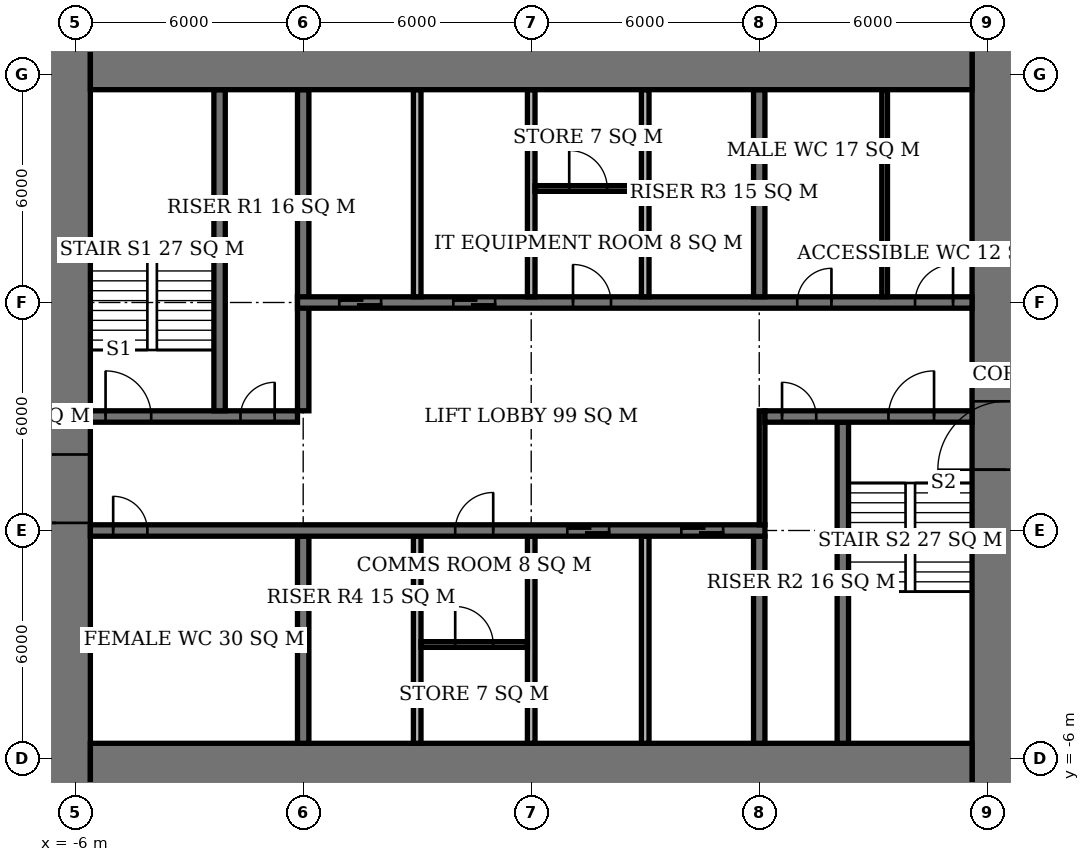
"""IFC4 building model, lengths in metres.
Left out: names, types, materials, properties, quantities, classifications, styles, units other than length and angle.
Written with IfcOpenShell. Run it as: python <this file> out.ifc"""

import sys

from ifc_helpers import new_model, si_unit, direction, frame, frame_2d, origin, place, context, subcontext, project, spatial, rectangle, extrude, element, fill, save


model = new_model("IFC4")
c1 = context("Model", 3, precision=1e-05, world=origin(), true_north=direction((0.0, 1.0)))
c2 = subcontext(c1, "Body", "Model", "MODEL_VIEW")
j1 = project(units=[si_unit("LENGTHUNIT", "METRE"), si_unit("PLANEANGLEUNIT", "RADIAN")], contexts=[c1])
p1 = place(None, origin())
s1 = spatial("IfcSite", under=j1, at=p1, CompositionType="ELEMENT")
p2 = place(p1, origin())
s2 = spatial("IfcBuilding", under=s1, at=p2, CompositionType="ELEMENT")
p3 = place(p2, frame((0.0, 0.0, 224.0)))
s3 = spatial("IfcBuildingStorey", under=s2, at=p3, CompositionType="ELEMENT", Elevation=224.0)
for number, where, z_axis, x_axis in (
    (1, (-5.6, -6.6, 0.0), (0.0, 0.0, 1.0), (1.0, 0.0, 0.0)),
    (2, (-5.6, 12.6, 0.0), (0.0, 0.0, 1.0), (1.0, 0.0, 0.0)),
):
    element("IfcWall", number, at=place(p3, frame(where, z_axis=z_axis, x_axis=x_axis)), inside=s3, PredefinedType="SHEAR", context=c2, shape_type="SweptSolid", body=[
        extrude(rectangle(XDim=23.2, YDim=2.0, at=frame_2d((11.6, 0.0))), origin(), (0.0, 0.0, 1.0), 3.9),
    ])
p4 = place(p3, frame((-6.5, -7.6, 0.0), z_axis=(0.0, 0.0, 1.0), x_axis=(0.0, 1.0, 0.0)))
e3 = element("IfcWall", 3, at=p4, inside=s3, PredefinedType="SHEAR", context=c2, shape_type="SweptSolid", body=[
    extrude(rectangle(XDim=21.2, YDim=1.8, at=frame_2d((10.6, 0.0))), origin(), (0.0, 0.0, 1.0), 3.9),
])
p5 = place(p4, frame((7.8, 0.0, 0.0)))
e4 = element("IfcOpeningElement", 4, at=p5, cuts=e3, PredefinedType="OPENING", context=c2, shape_type="SweptSolid", body=[
    extrude(rectangle(XDim=1.8, YDim=2.4, at=frame_2d((0.9, 1.2))), frame((0.0, 0.91, 0.0), z_axis=(0.0, -1.0, 0.0), x_axis=(1.0, 0.0, 0.0)), (0.0, 0.0, 1.0), 1.82),
])
p6 = place(p3, frame((18.5, -7.6, 0.0), z_axis=(0.0, 0.0, 1.0), x_axis=(0.0, 1.0, 0.0)))
e5 = element("IfcWall", 5, at=p6, inside=s3, PredefinedType="SHEAR", context=c2, shape_type="SweptSolid", body=[
    extrude(rectangle(XDim=21.2, YDim=1.8, at=frame_2d((10.6, 0.0))), origin(), (0.0, 0.0, 1.0), 3.9),
])
p7 = place(p6, frame((9.2, 0.0, 0.0)))
e6 = element("IfcOpeningElement", 6, at=p7, cuts=e5, PredefinedType="OPENING", context=c2, shape_type="SweptSolid", body=[
    extrude(rectangle(XDim=1.8, YDim=2.4, at=frame_2d((0.9, 1.2))), frame((0.0, 0.91, 0.0), z_axis=(0.0, -1.0, 0.0), x_axis=(1.0, 0.0, 0.0)), (0.0, 0.0, 1.0), 1.82),
])
p8 = place(p3, frame((-5.6, 0.0, 0.0), z_axis=(0.0, 0.0, 1.0), x_axis=(1.0, 0.0, 0.0)))
e7 = element("IfcWall", 7, at=p8, inside=s3, PredefinedType="SHEAR", context=c2, shape_type="SweptSolid", body=[
    extrude(rectangle(XDim=17.75, YDim=0.3, at=frame_2d((8.875, 0.0))), origin(), (0.0, 0.0, 1.0), 3.9),
])
p9 = place(p8, frame((0.6, 0.0, 0.0)))
e8 = element("IfcOpeningElement", 8, at=p9, cuts=e7, PredefinedType="OPENING", context=c2, shape_type="SweptSolid", body=[
    extrude(rectangle(XDim=0.9, YDim=2.1, at=frame_2d((0.45, 1.05))), frame((0.0, 0.16, 0.0), z_axis=(0.0, -1.0, 0.0), x_axis=(1.0, 0.0, 0.0)), (0.0, 0.0, 1.0), 0.32),
])
p10 = place(p8, frame((9.6, 0.0, 0.0)))
e9 = element("IfcOpeningElement", 9, at=p10, cuts=e7, PredefinedType="OPENING", context=c2, shape_type="SweptSolid", body=[
    extrude(rectangle(XDim=1.0, YDim=2.1, at=frame_2d((0.5, 1.05))), frame((0.0, 0.16, 0.0), z_axis=(0.0, -1.0, 0.0), x_axis=(1.0, 0.0, 0.0)), (0.0, 0.0, 1.0), 0.32),
])
p11 = place(p8, frame((12.55, 0.0, 0.0)))
e10 = element("IfcOpeningElement", 10, at=p11, cuts=e7, PredefinedType="OPENING", context=c2, shape_type="SweptSolid", body=[
    extrude(rectangle(XDim=1.1, YDim=2.1, at=frame_2d((0.55, 1.05))), frame((0.0, 0.16, 0.0), z_axis=(0.0, -1.0, 0.0), x_axis=(1.0, 0.0, 0.0)), (0.0, 0.0, 1.0), 0.32),
])
p12 = place(p8, frame((15.55, 0.0, 0.0)))
e11 = element("IfcOpeningElement", 11, at=p12, cuts=e7, PredefinedType="OPENING", context=c2, shape_type="SweptSolid", body=[
    extrude(rectangle(XDim=1.1, YDim=2.1, at=frame_2d((0.55, 1.05))), frame((0.0, 0.16, 0.0), z_axis=(0.0, -1.0, 0.0), x_axis=(1.0, 0.0, 0.0)), (0.0, 0.0, 1.0), 0.32),
])
p13 = place(p3, frame((-5.6, 3.0, 0.0), z_axis=(0.0, 0.0, 1.0), x_axis=(1.0, 0.0, 0.0)))
e12 = element("IfcWall", 12, at=p13, inside=s3, PredefinedType="SHEAR", context=c2, shape_type="SweptSolid", body=[
    extrude(rectangle(XDim=5.45, YDim=0.3, at=frame_2d((2.725, 0.0))), origin(), (0.0, 0.0, 1.0), 3.9),
])
p14 = place(p13, frame((0.4, 0.0, 0.0)))
e13 = element("IfcOpeningElement", 13, at=p14, cuts=e12, PredefinedType="OPENING", context=c2, shape_type="SweptSolid", body=[
    extrude(rectangle(XDim=1.2, YDim=2.1, at=frame_2d((0.6, 1.05))), frame((0.0, 0.16, 0.0), z_axis=(0.0, -1.0, 0.0), x_axis=(1.0, 0.0, 0.0)), (0.0, 0.0, 1.0), 0.32),
])
p15 = place(p13, frame((3.95, 0.0, 0.0)))
e14 = element("IfcOpeningElement", 14, at=p15, cuts=e12, PredefinedType="OPENING", context=c2, shape_type="SweptSolid", body=[
    extrude(rectangle(XDim=0.9, YDim=2.1, at=frame_2d((0.45, 1.05))), frame((0.0, 0.16, 0.0), z_axis=(0.0, -1.0, 0.0), x_axis=(1.0, 0.0, 0.0)), (0.0, 0.0, 1.0), 0.32),
])
p16 = place(p3, frame((12.15, 3.0, 0.0), z_axis=(0.0, 0.0, 1.0), x_axis=(1.0, 0.0, 0.0)))
e15 = element("IfcWall", 15, at=p16, inside=s3, PredefinedType="SHEAR", context=c2, shape_type="SweptSolid", body=[
    extrude(rectangle(XDim=5.45, YDim=0.3, at=frame_2d((2.725, 0.0))), origin(), (0.0, 0.0, 1.0), 3.9),
])
p17 = place(p16, frame((3.25, 0.0, 0.0)))
e16 = element("IfcOpeningElement", 16, at=p17, cuts=e15, PredefinedType="OPENING", context=c2, shape_type="SweptSolid", body=[
    extrude(rectangle(XDim=1.2, YDim=2.1, at=frame_2d((0.6, 1.05))), frame((0.0, 0.16, 0.0), z_axis=(0.0, -1.0, 0.0), x_axis=(1.0, 0.0, 0.0)), (0.0, 0.0, 1.0), 0.32),
])
p18 = place(p16, frame((0.45, 0.0, 0.0)))
e17 = element("IfcOpeningElement", 17, at=p18, cuts=e15, PredefinedType="OPENING", context=c2, shape_type="SweptSolid", body=[
    extrude(rectangle(XDim=0.9, YDim=2.1, at=frame_2d((0.45, 1.05))), frame((0.0, 0.16, 0.0), z_axis=(0.0, -1.0, 0.0), x_axis=(1.0, 0.0, 0.0)), (0.0, 0.0, 1.0), 0.32),
])
p19 = place(p3, frame((-0.15, 6.0, 0.0), z_axis=(0.0, 0.0, 1.0), x_axis=(1.0, 0.0, 0.0)))
e18 = element("IfcWall", 18, at=p19, inside=s3, PredefinedType="SHEAR", context=c2, shape_type="SweptSolid", body=[
    extrude(rectangle(XDim=17.75, YDim=0.3, at=frame_2d((8.875, 0.0))), origin(), (0.0, 0.0, 1.0), 3.9),
])
p20 = place(p19, frame((13.15, 0.0, 0.0)))
e19 = element("IfcOpeningElement", 19, at=p20, cuts=e18, PredefinedType="OPENING", context=c2, shape_type="SweptSolid", body=[
    extrude(rectangle(XDim=0.9, YDim=2.1, at=frame_2d((0.45, 1.05))), frame((0.0, 0.16, 0.0), z_axis=(0.0, -1.0, 0.0), x_axis=(1.0, 0.0, 0.0)), (0.0, 0.0, 1.0), 0.32),
])
p21 = place(p19, frame((16.25, 0.0, 0.0)))
e20 = element("IfcOpeningElement", 20, at=p21, cuts=e18, PredefinedType="OPENING", context=c2, shape_type="SweptSolid", body=[
    extrude(rectangle(XDim=1.0, YDim=2.1, at=frame_2d((0.5, 1.05))), frame((0.0, 0.16, 0.0), z_axis=(0.0, -1.0, 0.0), x_axis=(1.0, 0.0, 0.0)), (0.0, 0.0, 1.0), 0.32),
])
p22 = place(p19, frame((7.25, 0.0, 0.0)))
e21 = element("IfcOpeningElement", 21, at=p22, cuts=e18, PredefinedType="OPENING", context=c2, shape_type="SweptSolid", body=[
    extrude(rectangle(XDim=1.0, YDim=2.1, at=frame_2d((0.5, 1.05))), frame((0.0, 0.16, 0.0), z_axis=(0.0, -1.0, 0.0), x_axis=(1.0, 0.0, 0.0)), (0.0, 0.0, 1.0), 0.32),
])
p23 = place(p19, frame((1.1, 0.0, 0.0)))
e22 = element("IfcOpeningElement", 22, at=p23, cuts=e18, PredefinedType="OPENING", context=c2, shape_type="SweptSolid", body=[
    extrude(rectangle(XDim=1.1, YDim=2.1, at=frame_2d((0.55, 1.05))), frame((0.0, 0.16, 0.0), z_axis=(0.0, -1.0, 0.0), x_axis=(1.0, 0.0, 0.0)), (0.0, 0.0, 1.0), 0.32),
])
p24 = place(p19, frame((4.1, 0.0, 0.0)))
e23 = element("IfcOpeningElement", 23, at=p24, cuts=e18, PredefinedType="OPENING", context=c2, shape_type="SweptSolid", body=[
    extrude(rectangle(XDim=1.1, YDim=2.1, at=frame_2d((0.55, 1.05))), frame((0.0, 0.16, 0.0), z_axis=(0.0, -1.0, 0.0), x_axis=(1.0, 0.0, 0.0)), (0.0, 0.0, 1.0), 0.32),
])
p25 = place(p3, frame((0.0, -5.6, 0.0), z_axis=(0.0, 0.0, 1.0), x_axis=(0.0, 1.0, 0.0)))
e24 = element("IfcWall", 24, at=p25, inside=s3, PredefinedType="SHEAR", context=c2, shape_type="SweptSolid", body=[
    extrude(rectangle(XDim=5.45, YDim=0.3, at=frame_2d((2.725, 0.0))), origin(), (0.0, 0.0, 1.0), 3.9),
])
p26 = place(p3, frame((0.0, 3.15, 0.0), z_axis=(0.0, 0.0, 1.0), x_axis=(0.0, 1.0, 0.0)))
e25 = element("IfcWall", 25, at=p26, inside=s3, PredefinedType="SHEAR", context=c2, shape_type="SweptSolid", body=[
    extrude(rectangle(XDim=8.45, YDim=0.3, at=frame_2d((4.225, 0.0))), origin(), (0.0, 0.0, 1.0), 3.9),
])
for number, where, z_axis, x_axis in (
    (26, (12.0, -5.6, 0.0), (0.0, 0.0, 1.0), (0.0, 1.0, 0.0)),
    (27, (12.0, 6.15, 0.0), (0.0, 0.0, 1.0), (0.0, 1.0, 0.0)),
):
    element("IfcWall", number, at=place(p3, frame(where, z_axis=z_axis, x_axis=x_axis)), inside=s3, PredefinedType="SHEAR", context=c2, shape_type="SweptSolid", body=[
        extrude(rectangle(XDim=5.45, YDim=0.3, at=frame_2d((2.725, 0.0))), origin(), (0.0, 0.0, 1.0), 3.9),
    ])
for number, where, z_axis, x_axis in (
    (28, (-2.2, 3.15, 0.0), (0.0, 0.0, 1.0), (0.0, 1.0, 0.0)),
    (29, (14.2, -5.6, 0.0), (0.0, 0.0, 1.0), (0.0, 1.0, 0.0)),
):
    element("IfcWall", number, at=place(p3, frame(where, z_axis=z_axis, x_axis=x_axis)), inside=s3, PredefinedType="SHEAR", context=c2, shape_type="SweptSolid", body=[
        extrude(rectangle(XDim=8.45, YDim=0.3, at=frame_2d((4.225, 0.0))), origin(), (0.0, 0.0, 1.0), 3.9),
    ])
for number, where, z_axis, x_axis in (
    (30, (3.0, 6.15, 0.0), (0.0, 0.0, 1.0), (0.0, 1.0, 0.0)),
    (31, (6.0, 6.15, 0.0), (0.0, 0.0, 1.0), (0.0, 1.0, 0.0)),
    (32, (9.0, 6.15, 0.0), (0.0, 0.0, 1.0), (0.0, 1.0, 0.0)),
    (33, (3.0, -5.6, 0.0), (0.0, 0.0, 1.0), (0.0, 1.0, 0.0)),
    (34, (6.0, -5.6, 0.0), (0.0, 0.0, 1.0), (0.0, 1.0, 0.0)),
    (35, (9.0, -5.6, 0.0), (0.0, 0.0, 1.0), (0.0, 1.0, 0.0)),
):
    element("IfcWall", number, at=place(p3, frame(where, z_axis=z_axis, x_axis=x_axis)), inside=s3, PredefinedType="SOLIDWALL", context=c2, shape_type="SweptSolid", body=[
        extrude(rectangle(XDim=5.45, YDim=0.2, at=frame_2d((2.725, 0.0))), origin(), (0.0, 0.0, 1.0), 3.9),
    ])
p27 = place(p3, frame((15.3, 6.15, 0.0), z_axis=(0.0, 0.0, 1.0), x_axis=(0.0, 1.0, 0.0)))
e36 = element("IfcWall", 36, at=p27, inside=s3, PredefinedType="PLUMBINGWALL", context=c2, shape_type="SweptSolid", body=[
    extrude(rectangle(XDim=5.45, YDim=0.15, at=frame_2d((2.725, 0.0))), origin(), (0.0, 0.0, 1.0), 3.65),
])
p28 = place(p3, frame((6.1, 9.0, 0.0), z_axis=(0.0, 0.0, 1.0), x_axis=(1.0, 0.0, 0.0)))
e37 = element("IfcWall", 37, at=p28, inside=s3, PredefinedType="PARTITIONING", context=c2, shape_type="SweptSolid", body=[
    extrude(rectangle(XDim=2.8, YDim=0.15, at=frame_2d((1.4, 0.0))), origin(), (0.0, 0.0, 1.0), 3.65),
])
p29 = place(p28, frame((0.9, 0.0, 0.0)))
e38 = element("IfcOpeningElement", 38, at=p29, cuts=e37, PredefinedType="OPENING", context=c2, shape_type="SweptSolid", body=[
    extrude(rectangle(XDim=1.0, YDim=2.1, at=frame_2d((0.5, 1.05))), frame((0.0, 0.085, 0.0), z_axis=(0.0, -1.0, 0.0), x_axis=(1.0, 0.0, 0.0)), (0.0, 0.0, 1.0), 0.17),
])
p30 = place(p3, frame((3.1, -3.0, 0.0), z_axis=(0.0, 0.0, 1.0), x_axis=(1.0, 0.0, 0.0)))
e39 = element("IfcWall", 39, at=p30, inside=s3, PredefinedType="PARTITIONING", context=c2, shape_type="SweptSolid", body=[
    extrude(rectangle(XDim=2.8, YDim=0.15, at=frame_2d((1.4, 0.0))), origin(), (0.0, 0.0, 1.0), 3.65),
])
p31 = place(p30, frame((0.9, 0.0, 0.0)))
e40 = element("IfcOpeningElement", 40, at=p31, cuts=e39, PredefinedType="OPENING", context=c2, shape_type="SweptSolid", body=[
    extrude(rectangle(XDim=1.0, YDim=2.1, at=frame_2d((0.5, 1.05))), frame((0.0, 0.085, 0.0), z_axis=(0.0, -1.0, 0.0), x_axis=(1.0, 0.0, 0.0)), (0.0, 0.0, 1.0), 0.17),
])
p32 = place(p3, frame((12.075, 0.15, 0.0), z_axis=(0.0, 0.0, 1.0), x_axis=(0.0, 1.0, 0.0)))
e41 = element("IfcWall", 41, at=p32, inside=s3, PredefinedType="PARTITIONING", context=c2, shape_type="SweptSolid", body=[
    extrude(rectangle(XDim=3.0, YDim=0.15, at=frame_2d((1.5, 0.0))), origin(), (0.0, 0.0, 1.0), 3.65),
])
p33 = place(p5, origin())
e42 = element("IfcDoor", 42, at=p33, inside=s3, OperationType="DOUBLE_DOOR_SINGLE_SWING", PredefinedType="DOOR", context=c2, shape_type="SweptSolid", body=[
    extrude(rectangle(XDim=1.8, YDim=2.4, at=frame_2d((0.9, 1.2))), frame((0.0, 0.025, 0.0), z_axis=(0.0, -1.0, 0.0), x_axis=(1.0, 0.0, 0.0)), (0.0, 0.0, 1.0), 0.05),
])
fill(e4, e42)
p34 = place(p7, origin())
e43 = element("IfcDoor", 43, at=p34, inside=s3, OperationType="DOUBLE_DOOR_SINGLE_SWING", PredefinedType="DOOR", context=c2, shape_type="SweptSolid", body=[
    extrude(rectangle(XDim=1.8, YDim=2.4, at=frame_2d((0.9, 1.2))), frame((0.0, 0.025, 0.0), z_axis=(0.0, -1.0, 0.0), x_axis=(1.0, 0.0, 0.0)), (0.0, 0.0, 1.0), 0.05),
])
fill(e6, e43)
p35 = place(p14, origin())
e44 = element("IfcDoor", 44, at=p35, inside=s3, OperationType="SINGLE_SWING_LEFT", PredefinedType="DOOR", context=c2, shape_type="SweptSolid", body=[
    extrude(rectangle(XDim=1.2, YDim=2.1, at=frame_2d((0.6, 1.05))), frame((0.0, 0.025, 0.0), z_axis=(0.0, -1.0, 0.0), x_axis=(1.0, 0.0, 0.0)), (0.0, 0.0, 1.0), 0.05),
])
fill(e13, e44)
p36 = place(p15, origin())
e45 = element("IfcDoor", 45, at=p36, inside=s3, OperationType="SINGLE_SWING_RIGHT", PredefinedType="DOOR", context=c2, shape_type="SweptSolid", body=[
    extrude(rectangle(XDim=0.9, YDim=2.1, at=frame_2d((0.45, 1.05))), frame((0.0, 0.025, 0.0), z_axis=(0.0, -1.0, 0.0), x_axis=(1.0, 0.0, 0.0)), (0.0, 0.0, 1.0), 0.05),
])
fill(e14, e45)
p37 = place(p17, origin())
e46 = element("IfcDoor", 46, at=p37, inside=s3, OperationType="SINGLE_SWING_RIGHT", PredefinedType="DOOR", context=c2, shape_type="SweptSolid", body=[
    extrude(rectangle(XDim=1.2, YDim=2.1, at=frame_2d((0.6, 1.05))), frame((0.0, 0.025, 0.0), z_axis=(0.0, -1.0, 0.0), x_axis=(1.0, 0.0, 0.0)), (0.0, 0.0, 1.0), 0.05),
])
fill(e16, e46)
p38 = place(p18, origin())
e47 = element("IfcDoor", 47, at=p38, inside=s3, OperationType="SINGLE_SWING_LEFT", PredefinedType="DOOR", context=c2, shape_type="SweptSolid", body=[
    extrude(rectangle(XDim=0.9, YDim=2.1, at=frame_2d((0.45, 1.05))), frame((0.0, 0.025, 0.0), z_axis=(0.0, -1.0, 0.0), x_axis=(1.0, 0.0, 0.0)), (0.0, 0.0, 1.0), 0.05),
])
fill(e17, e47)
p39 = place(p9, origin())
e48 = element("IfcDoor", 48, at=p39, inside=s3, OperationType="SINGLE_SWING_LEFT", PredefinedType="DOOR", context=c2, shape_type="SweptSolid", body=[
    extrude(rectangle(XDim=0.9, YDim=2.1, at=frame_2d((0.45, 1.05))), frame((0.0, 0.025, 0.0), z_axis=(0.0, -1.0, 0.0), x_axis=(1.0, 0.0, 0.0)), (0.0, 0.0, 1.0), 0.05),
])
fill(e8, e48)
p40 = place(p20, origin())
e49 = element("IfcDoor", 49, at=p40, inside=s3, OperationType="SINGLE_SWING_RIGHT", PredefinedType="DOOR", context=c2, shape_type="SweptSolid", body=[
    extrude(rectangle(XDim=0.9, YDim=2.1, at=frame_2d((0.45, 1.05))), frame((0.0, 0.025, 0.0), z_axis=(0.0, -1.0, 0.0), x_axis=(1.0, 0.0, 0.0)), (0.0, 0.0, 1.0), 0.05),
])
fill(e19, e49)
p41 = place(p21, origin())
e50 = element("IfcDoor", 50, at=p41, inside=s3, OperationType="SINGLE_SWING_RIGHT", PredefinedType="DOOR", context=c2, shape_type="SweptSolid", body=[
    extrude(rectangle(XDim=1.0, YDim=2.1, at=frame_2d((0.5, 1.05))), frame((0.0, 0.025, 0.0), z_axis=(0.0, -1.0, 0.0), x_axis=(1.0, 0.0, 0.0)), (0.0, 0.0, 1.0), 0.05),
])
fill(e20, e50)
p42 = place(p29, origin())
e51 = element("IfcDoor", 51, at=p42, inside=s3, OperationType="SINGLE_SWING_LEFT", PredefinedType="DOOR", context=c2, shape_type="SweptSolid", body=[
    extrude(rectangle(XDim=1.0, YDim=2.1, at=frame_2d((0.5, 1.05))), frame((0.0, 0.025, 0.0), z_axis=(0.0, -1.0, 0.0), x_axis=(1.0, 0.0, 0.0)), (0.0, 0.0, 1.0), 0.05),
])
fill(e38, e51)
p43 = place(p22, origin())
e52 = element("IfcDoor", 52, at=p43, inside=s3, OperationType="SINGLE_SWING_LEFT", PredefinedType="DOOR", context=c2, shape_type="SweptSolid", body=[
    extrude(rectangle(XDim=1.0, YDim=2.1, at=frame_2d((0.5, 1.05))), frame((0.0, 0.025, 0.0), z_axis=(0.0, -1.0, 0.0), x_axis=(1.0, 0.0, 0.0)), (0.0, 0.0, 1.0), 0.05),
])
fill(e21, e52)
p44 = place(p31, origin())
e53 = element("IfcDoor", 53, at=p44, inside=s3, OperationType="SINGLE_SWING_LEFT", PredefinedType="DOOR", context=c2, shape_type="SweptSolid", body=[
    extrude(rectangle(XDim=1.0, YDim=2.1, at=frame_2d((0.5, 1.05))), frame((0.0, 0.025, 0.0), z_axis=(0.0, -1.0, 0.0), x_axis=(1.0, 0.0, 0.0)), (0.0, 0.0, 1.0), 0.05),
])
fill(e40, e53)
p45 = place(p10, origin())
e54 = element("IfcDoor", 54, at=p45, inside=s3, OperationType="SINGLE_SWING_RIGHT", PredefinedType="DOOR", context=c2, shape_type="SweptSolid", body=[
    extrude(rectangle(XDim=1.0, YDim=2.1, at=frame_2d((0.5, 1.05))), frame((0.0, 0.025, 0.0), z_axis=(0.0, -1.0, 0.0), x_axis=(1.0, 0.0, 0.0)), (0.0, 0.0, 1.0), 0.05),
])
fill(e9, e54)
p46 = place(p23, origin())
e55 = element("IfcDoor", 55, at=p46, inside=s3, OperationType="DOUBLE_DOOR_SLIDING", PredefinedType="USERDEFINED", context=c2, shape_type="SweptSolid", body=[
    extrude(rectangle(XDim=1.1, YDim=2.1, at=frame_2d((0.55, 1.05))), frame((0.0, 0.025, 0.0), z_axis=(0.0, -1.0, 0.0), x_axis=(1.0, 0.0, 0.0)), (0.0, 0.0, 1.0), 0.05),
])
fill(e22, e55)
p47 = place(p24, origin())
e56 = element("IfcDoor", 56, at=p47, inside=s3, OperationType="DOUBLE_DOOR_SLIDING", PredefinedType="USERDEFINED", context=c2, shape_type="SweptSolid", body=[
    extrude(rectangle(XDim=1.1, YDim=2.1, at=frame_2d((0.55, 1.05))), frame((0.0, 0.025, 0.0), z_axis=(0.0, -1.0, 0.0), x_axis=(1.0, 0.0, 0.0)), (0.0, 0.0, 1.0), 0.05),
])
fill(e23, e56)
p48 = place(p11, origin())
e57 = element("IfcDoor", 57, at=p48, inside=s3, OperationType="DOUBLE_DOOR_SLIDING", PredefinedType="USERDEFINED", context=c2, shape_type="SweptSolid", body=[
    extrude(rectangle(XDim=1.1, YDim=2.1, at=frame_2d((0.55, 1.05))), frame((0.0, 0.025, 0.0), z_axis=(0.0, -1.0, 0.0), x_axis=(1.0, 0.0, 0.0)), (0.0, 0.0, 1.0), 0.05),
])
fill(e10, e57)
p49 = place(p12, origin())
e58 = element("IfcDoor", 58, at=p49, inside=s3, OperationType="DOUBLE_DOOR_SLIDING", PredefinedType="USERDEFINED", context=c2, shape_type="SweptSolid", body=[
    extrude(rectangle(XDim=1.1, YDim=2.1, at=frame_2d((0.55, 1.05))), frame((0.0, 0.025, 0.0), z_axis=(0.0, -1.0, 0.0), x_axis=(1.0, 0.0, 0.0)), (0.0, 0.0, 1.0), 0.05),
])
fill(e11, e58)
save(model, sys.argv[1])
